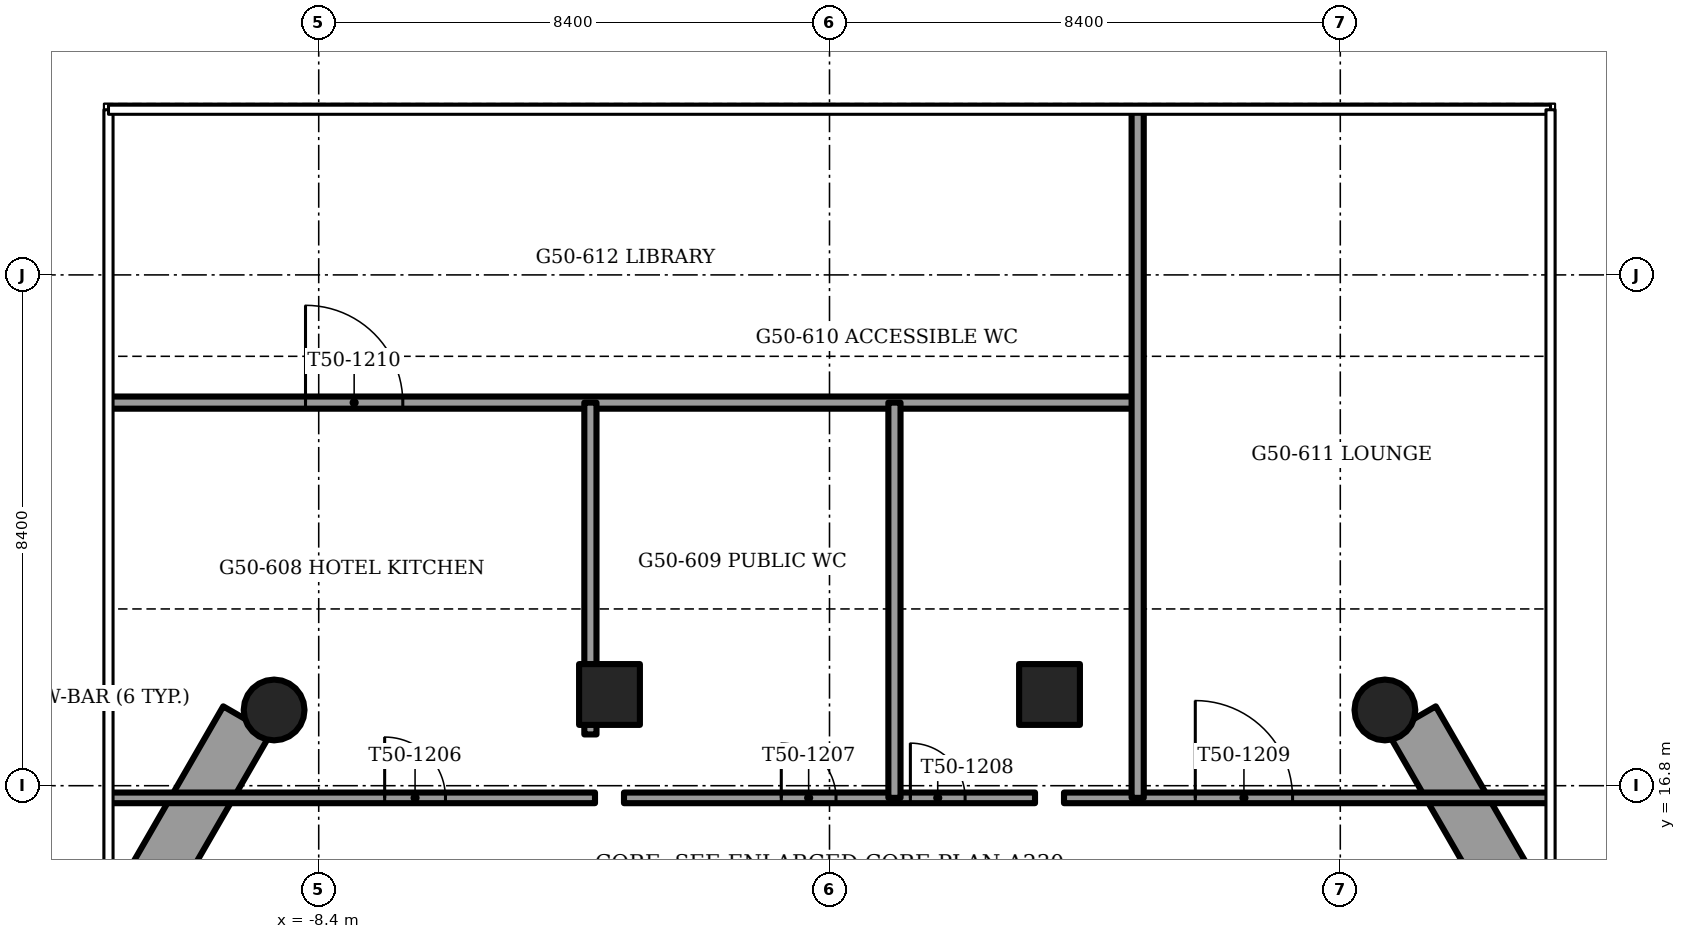
"""IFC4 building model, lengths in metres.
Left out: names, types, materials, properties, quantities, classifications, styles, units other than length and angle.
Written with IfcOpenShell. Run it as: python <this file> out.ifc"""

import sys

from ifc_helpers import new_model, si_unit, direction, frame, frame_2d, origin, origin_2d, place, context, subcontext, project, spatial, rectangle, circle, extrude, element, fill, save


model = new_model("IFC4")
c1 = context("Model", 3, precision=1e-05, world=origin(), true_north=direction((0.0, 1.0)))
c2 = subcontext(c1, "Body", "Model", "MODEL_VIEW")
j1 = project(units=[si_unit("LENGTHUNIT", "METRE"), si_unit("PLANEANGLEUNIT", "RADIAN")], contexts=[c1])
p1 = place(None, origin())
s1 = spatial("IfcSite", under=j1, at=p1, CompositionType="ELEMENT")
p2 = place(p1, origin())
s2 = spatial("IfcBuilding", under=s1, at=p2, CompositionType="ELEMENT")
p3 = place(p2, frame((0.0, 0.0, 202.0)))
s3 = spatial("IfcBuildingStorey", under=s2, at=p3, CompositionType="ELEMENT", Elevation=202.0)
for number, where, z_axis, x_axis in (
    (1, (-9.134, 18.045, -1.2), (0.0, 0.0, 1.0), (1.0, 0.0, 0.0)),
    (2, (9.134, 18.045, -1.2), (0.0, 0.0, 1.0), (1.0, 0.0, 0.0)),
):
    element("IfcColumn", number, at=place(p3, frame(where, z_axis=z_axis, x_axis=x_axis)), inside=s3, PredefinedType="COLUMN", context=c2, shape_type="SweptSolid", body=[
        extrude(circle(Radius=0.5, at=origin_2d()), origin(), (0.0, 0.0, 1.0), 3.75),
    ])
for number, where, z_axis, x_axis in (
    (3, (3.618, 18.3, -1.2), (0.0, 0.0, 1.0), (1.0, 0.0, 0.0)),
    (4, (-3.618, 18.3, -1.2), (0.0, 0.0, 1.0), (1.0, 0.0, 0.0)),
):
    element("IfcColumn", number, at=place(p3, frame(where, z_axis=z_axis, x_axis=x_axis)), inside=s3, PredefinedType="COLUMN", context=c2, shape_type="SweptSolid", body=[
        extrude(rectangle(XDim=1.0, YDim=1.0, at=origin_2d()), origin(), (0.0, 0.0, 1.0), 3.75),
    ])
for number, where, z_axis, x_axis in (
    (5, (-9.581, 17.88, 0.0), (0.0, 0.0, 1.0), (-0.5, -0.866, 0.0)),
    (6, (12.884, 12.159, 0.0), (0.0, 0.0, 1.0), (-0.5, 0.866, 0.0)),
):
    element("IfcWall", number, at=place(p3, frame(where, z_axis=z_axis, x_axis=x_axis)), inside=s3, PredefinedType="PARAPET", context=c2, shape_type="SweptSolid", body=[
        extrude(rectangle(XDim=6.606, YDim=0.9, at=frame_2d((3.303, 0.0))), origin(), (0.0, 0.0, 1.0), 1.1),
    ])
p4 = place(p3, frame((-11.838, 16.6, 0.0), z_axis=(0.0, 0.0, 1.0), x_axis=(1.0, 0.0, 0.0)))
e7 = element("IfcWall", 7, at=p4, inside=s3, PredefinedType="PARTITIONING", context=c2, shape_type="SweptSolid", body=[
    extrude(rectangle(XDim=7.982, YDim=0.175, at=frame_2d((3.991, 0.0))), origin(), (0.0, 0.0, 1.0), 2.25),
])
p5 = place(p4, frame((4.523, 0.0, 0.0)))
e8 = element("IfcOpeningElement", 8, at=p5, cuts=e7, PredefinedType="OPENING", context=c2, shape_type="SweptSolid", body=[
    extrude(rectangle(XDim=1.0, YDim=2.1, at=frame_2d((0.5, 1.05))), frame((0.0, 0.087, 0.0), z_axis=(0.0, -1.0, 0.0), x_axis=(1.0, 0.0, 0.0)), (0.0, 0.0, 1.0), 0.175),
])
p6 = place(p3, frame((-3.38, 16.6, 0.0), z_axis=(0.0, 0.0, 1.0), x_axis=(1.0, 0.0, 0.0)))
e9 = element("IfcWall", 9, at=p6, inside=s3, PredefinedType="PARTITIONING", context=c2, shape_type="SweptSolid", body=[
    extrude(rectangle(XDim=6.759, YDim=0.175, at=frame_2d((3.38, 0.0))), origin(), (0.0, 0.0, 1.0), 3.45),
])
p7 = place(p6, frame((2.587, 0.0, 0.0)))
e10 = element("IfcOpeningElement", 10, at=p7, cuts=e9, PredefinedType="OPENING", context=c2, shape_type="SweptSolid", body=[
    extrude(rectangle(XDim=0.9, YDim=2.1, at=frame_2d((0.45, 1.05))), frame((0.0, 0.087, 0.0), z_axis=(0.0, -1.0, 0.0), x_axis=(1.0, 0.0, 0.0)), (0.0, 0.0, 1.0), 0.175),
])
p8 = place(p6, frame((4.71, 0.0, 0.0)))
e11 = element("IfcOpeningElement", 11, at=p8, cuts=e9, PredefinedType="OPENING", context=c2, shape_type="SweptSolid", body=[
    extrude(rectangle(XDim=0.9, YDim=2.1, at=frame_2d((0.45, 1.05))), frame((0.0, 0.087, 0.0), z_axis=(0.0, -1.0, 0.0), x_axis=(1.0, 0.0, 0.0)), (0.0, 0.0, 1.0), 0.175),
])
p9 = place(p3, frame((3.856, 16.6, 0.0), z_axis=(0.0, 0.0, 1.0), x_axis=(1.0, 0.0, 0.0)))
e12 = element("IfcWall", 12, at=p9, inside=s3, PredefinedType="PARTITIONING", context=c2, shape_type="SweptSolid", body=[
    extrude(rectangle(XDim=7.982, YDim=0.175, at=frame_2d((3.991, 0.0))), origin(), (0.0, 0.0, 1.0), 2.25),
])
p10 = place(p9, frame((2.159, 0.0, 0.0)))
e13 = element("IfcOpeningElement", 13, at=p10, cuts=e12, PredefinedType="OPENING", context=c2, shape_type="SweptSolid", body=[
    extrude(rectangle(XDim=1.6, YDim=2.1, at=frame_2d((0.8, 1.05))), frame((0.0, 0.087, 0.0), z_axis=(0.0, -1.0, 0.0), x_axis=(1.0, 0.0, 0.0)), (0.0, 0.0, 1.0), 0.175),
])
p11 = place(p3, frame((-11.838, 23.1, 0.0), z_axis=(0.0, 0.0, 1.0), x_axis=(1.0, 0.0, 0.0)))
e14 = element("IfcWall", 14, at=p11, inside=s3, PredefinedType="PARTITIONING", context=c2, shape_type="SweptSolid", body=[
    extrude(rectangle(XDim=16.906, YDim=0.2, at=frame_2d((8.453, 0.0))), origin(), (0.0, 0.0, 1.0), 3.45),
])
p12 = place(p11, frame((3.221, 0.0, 0.0)))
e15 = element("IfcOpeningElement", 15, at=p12, cuts=e14, PredefinedType="OPENING", context=c2, shape_type="SweptSolid", body=[
    extrude(rectangle(XDim=1.6, YDim=2.1, at=frame_2d((0.8, 1.05))), frame((0.0, 0.1, 0.0), z_axis=(0.0, -1.0, 0.0), x_axis=(1.0, 0.0, 0.0)), (0.0, 0.0, 1.0), 0.2),
])
p13 = place(p3, frame((-3.932, 17.643, 0.0), z_axis=(0.0, 0.0, 1.0), x_axis=(0.0, 1.0, 0.0)))
e16 = element("IfcWall", 16, at=p13, inside=s3, PredefinedType="PARTITIONING", context=c2, shape_type="SweptSolid", body=[
    extrude(rectangle(XDim=5.457, YDim=0.2, at=frame_2d((2.729, 0.0))), origin(), (0.0, 0.0, 1.0), 2.839),
])
p14 = place(p3, frame((1.068, 16.6, 0.0), z_axis=(0.0, 0.0, 1.0), x_axis=(0.0, 1.0, 0.0)))
e17 = element("IfcWall", 17, at=p14, inside=s3, PredefinedType="PARTITIONING", context=c2, shape_type="SweptSolid", body=[
    extrude(rectangle(XDim=6.5, YDim=0.2, at=frame_2d((3.25, 0.0))), origin(), (0.0, 0.0, 1.0), 2.839),
])
p15 = place(p3, frame((5.068, 16.6, 0.0), z_axis=(0.0, 0.0, 1.0), x_axis=(0.0, 1.0, 0.0)))
e18 = element("IfcWall", 18, at=p15, inside=s3, PredefinedType="PARTITIONING", context=c2, shape_type="SweptSolid", body=[
    extrude(rectangle(XDim=11.297, YDim=0.2, at=frame_2d((5.648, 0.0))), origin(), (0.0, 0.0, 1.0), 2.839),
])
p16 = place(p5, origin())
e19 = element("IfcDoor", 19, at=p16, inside=s3, OperationType="SINGLE_SWING_RIGHT", PredefinedType="DOOR", context=c2, shape_type="SweptSolid", body=[
    extrude(rectangle(XDim=1.0, YDim=2.1, at=frame_2d((0.5, 1.05))), frame((0.0, 0.025, 0.0), z_axis=(0.0, -1.0, 0.0), x_axis=(1.0, 0.0, 0.0)), (0.0, 0.0, 1.0), 0.05),
])
fill(e8, e19)
p17 = place(p7, origin())
e20 = element("IfcDoor", 20, at=p17, inside=s3, OperationType="SINGLE_SWING_LEFT", PredefinedType="DOOR", context=c2, shape_type="SweptSolid", body=[
    extrude(rectangle(XDim=0.9, YDim=2.1, at=frame_2d((0.45, 1.05))), frame((0.0, 0.025, 0.0), z_axis=(0.0, -1.0, 0.0), x_axis=(1.0, 0.0, 0.0)), (0.0, 0.0, 1.0), 0.05),
])
fill(e10, e20)
p18 = place(p8, origin())
e21 = element("IfcDoor", 21, at=p18, inside=s3, OperationType="SINGLE_SWING_RIGHT", PredefinedType="DOOR", context=c2, shape_type="SweptSolid", body=[
    extrude(rectangle(XDim=0.9, YDim=2.1, at=frame_2d((0.45, 1.05))), frame((0.0, 0.025, 0.0), z_axis=(0.0, -1.0, 0.0), x_axis=(1.0, 0.0, 0.0)), (0.0, 0.0, 1.0), 0.05),
])
fill(e11, e21)
p19 = place(p10, origin())
e22 = element("IfcDoor", 22, at=p19, inside=s3, OperationType="DOUBLE_DOOR_SINGLE_SWING", PredefinedType="DOOR", context=c2, shape_type="SweptSolid", body=[
    extrude(rectangle(XDim=1.6, YDim=2.1, at=frame_2d((0.8, 1.05))), frame((0.0, 0.025, 0.0), z_axis=(0.0, -1.0, 0.0), x_axis=(1.0, 0.0, 0.0)), (0.0, 0.0, 1.0), 0.05),
])
fill(e13, e22)
p20 = place(p12, origin())
e23 = element("IfcDoor", 23, at=p20, inside=s3, OperationType="DOUBLE_DOOR_SINGLE_SWING", PredefinedType="DOOR", context=c2, shape_type="SweptSolid", body=[
    extrude(rectangle(XDim=1.6, YDim=2.1, at=frame_2d((0.8, 1.05))), frame((0.0, 0.025, 0.0), z_axis=(0.0, -1.0, 0.0), x_axis=(1.0, 0.0, 0.0)), (0.0, 0.0, 1.0), 0.05),
])
fill(e15, e23)
save(model, sys.argv[1])
